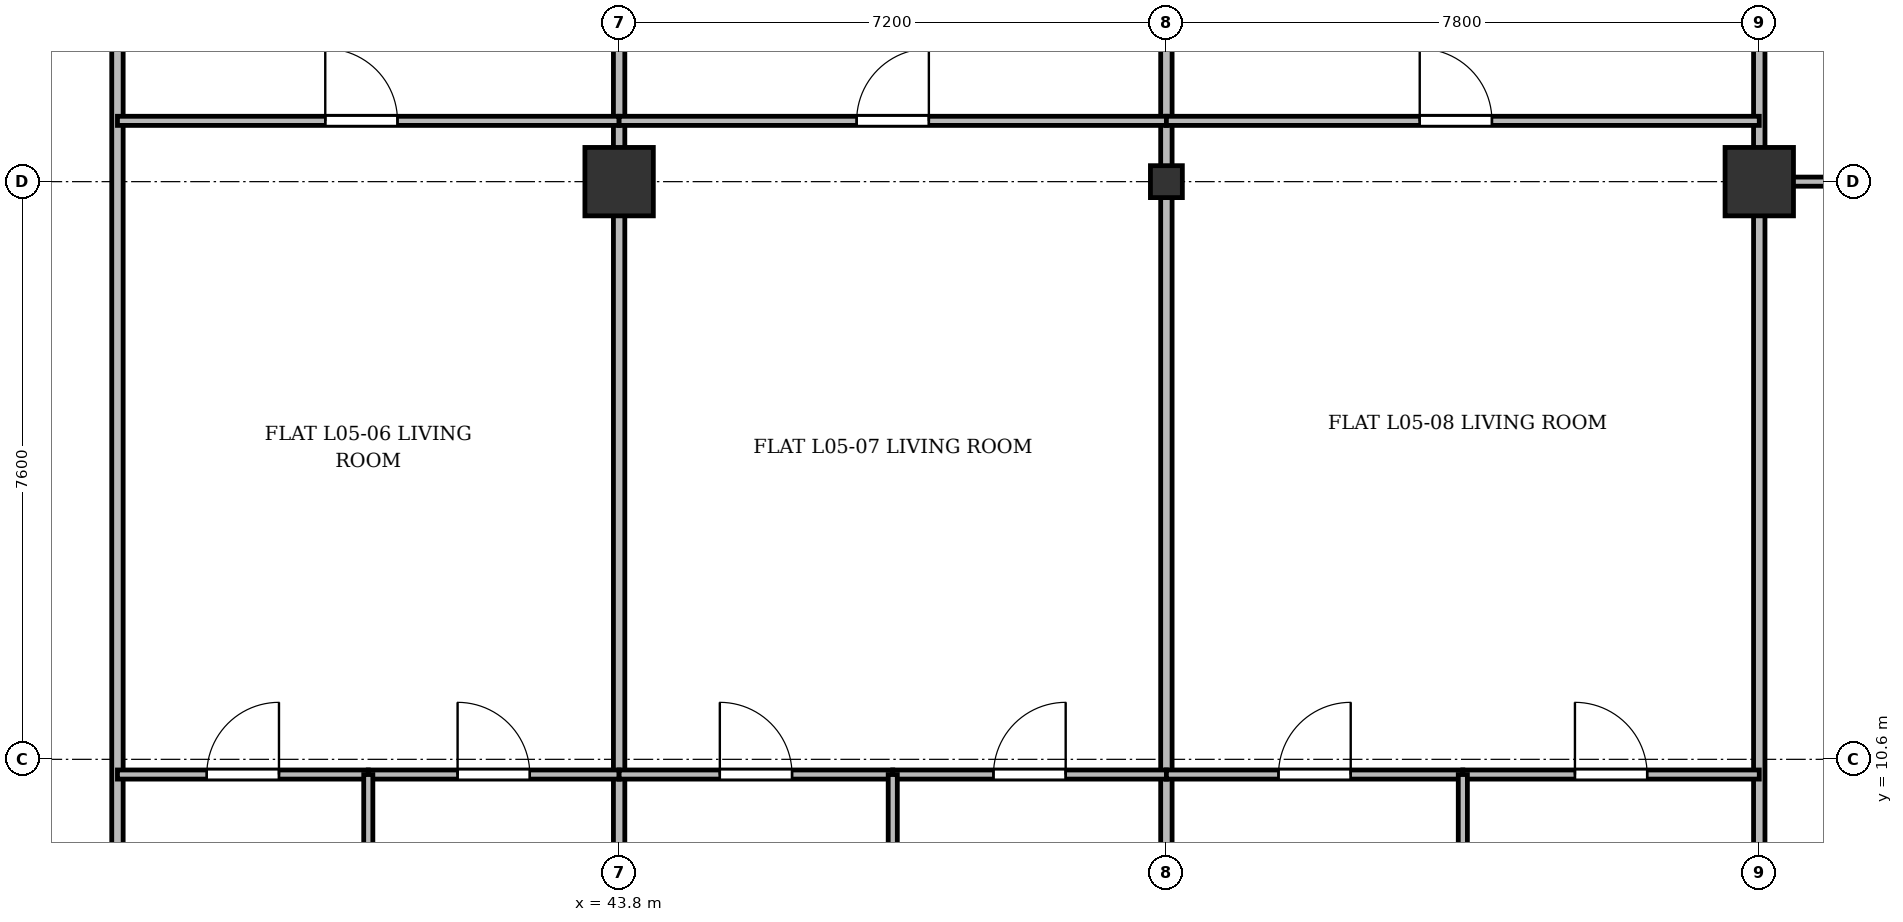
"""IFC4 building model, lengths in metres.
Left out: names, types, materials, properties, quantities, classifications, styles, units other than length and angle.
Written with IfcOpenShell. Run it as: python <this file> out.ifc"""

import sys

from ifc_helpers import new_model, si_unit, direction, frame, frame_2d, origin, origin_2d, place, context, subcontext, project, spatial, rectangle, i_section, extrude, source, transform, mapped, element, fill, save


model = new_model("IFC4")
c1 = context("Model", 3, precision=1e-05, world=origin(), true_north=direction((0.0, 1.0)))
c2 = subcontext(c1, "Body", "Model", "MODEL_VIEW")
j1 = project(units=[si_unit("LENGTHUNIT", "METRE"), si_unit("PLANEANGLEUNIT", "RADIAN")], contexts=[c1])
p1 = place(None, origin())
s1 = spatial("IfcSite", under=j1, at=p1, CompositionType="ELEMENT")
p2 = place(p1, origin())
s2 = spatial("IfcBuilding", under=s1, at=p2, CompositionType="ELEMENT")
p3 = place(p2, frame((0.0, 0.0, 23.5)))
s3 = spatial("IfcBuildingStorey", under=s2, at=p3, CompositionType="ELEMENT", Elevation=23.5)
m1 = source(origin(), c2, "Body", "SweptSolid", [
    extrude(rectangle(XDim=0.9, YDim=0.9, at=origin_2d()), origin(), (0.0, 0.0, 1.0), 3.6),
])
p4 = place(p3, frame((43.8, 18.2, 0.0), z_axis=(0.0, 0.0, 1.0), x_axis=(1.0, 0.0, 0.0)))
e1 = element("IfcColumn", 1, at=p4, inside=s3, PredefinedType="COLUMN", context=c2, shape_type="MappedRepresentation", body=[
    mapped(m1, transform((0.0, 0.0, 0.0), x_axis=(1.0, 0.0, 0.0), y_axis=(0.0, 1.0, 0.0), z_axis=(0.0, 0.0, 1.0), scale=1.0)),
])
m2 = source(origin(), c2, "Body", "SweptSolid", [
    extrude(i_section(OverallWidth=0.42, OverallDepth=0.42, WebThickness=0.026, FlangeThickness=0.04, at=origin_2d()), origin(), (0.0, 0.0, 1.0), 3.6),
])
p5 = place(p3, frame((51.0, 18.2, 0.0), z_axis=(0.0, 0.0, 1.0), x_axis=(1.0, 0.0, 0.0)))
e2 = element("IfcColumn", 2, at=p5, inside=s3, PredefinedType="COLUMN", context=c2, shape_type="MappedRepresentation", body=[
    mapped(m2, transform((0.0, 0.0, 0.0), x_axis=(1.0, 0.0, 0.0), y_axis=(0.0, 1.0, 0.0), z_axis=(0.0, 0.0, 1.0), scale=1.0)),
])
p6 = place(p3, frame((58.8, 18.2, 0.0), z_axis=(0.0, 0.0, 1.0), x_axis=(1.0, 0.0, 0.0)))
e3 = element("IfcColumn", 3, at=p6, inside=s3, PredefinedType="COLUMN", context=c2, shape_type="MappedRepresentation", body=[
    mapped(m1, transform((0.0, 0.0, 0.0), x_axis=(1.0, 0.0, 0.0), y_axis=(0.0, 1.0, 0.0), z_axis=(0.0, 0.0, 1.0), scale=1.0)),
])
p7 = place(p3, frame((37.2, 3.145, 0.0), z_axis=(0.0, 0.0, 1.0), x_axis=(0.0, 1.0, 0.0)))
e4 = element("IfcWall", 4, at=p7, inside=s3, PredefinedType="PARTITIONING", context=c2, shape_type="SweptSolid", body=[
    extrude(rectangle(XDim=24.455, YDim=0.15, at=frame_2d((12.228, 0.0))), origin(), (0.0, 0.0, 1.0), 2.69),
])
for number, where, z_axis, x_axis in (
    (5, (43.8, 3.145, 0.0), (0.0, 0.0, 1.0), (0.0, 1.0, 0.0)),
    (6, (51.0, 3.145, 0.0), (0.0, 0.0, 1.0), (0.0, 1.0, 0.0)),
    (7, (58.8, 3.145, 0.0), (0.0, 0.0, 1.0), (0.0, 1.0, 0.0)),
):
    element("IfcWall", number, at=place(p3, frame(where, z_axis=z_axis, x_axis=x_axis)), inside=s3, PredefinedType="PARTITIONING", context=c2, shape_type="SweptSolid", body=[
        extrude(rectangle(XDim=24.455, YDim=0.15, at=frame_2d((12.228, 0.0))), origin(), (0.0, 0.0, 1.0), 2.752),
    ])
p8 = place(p3, frame((37.2, 19.0, 0.0), z_axis=(0.0, 0.0, 1.0), x_axis=(1.0, 0.0, 0.0)))
e8 = element("IfcWall", 8, at=p8, inside=s3, PredefinedType="PARTITIONING", context=c2, shape_type="SweptSolid", body=[
    extrude(rectangle(XDim=6.6, YDim=0.12, at=frame_2d((3.3, 0.0))), origin(), (0.0, 0.0, 1.0), 2.752),
])
p9 = place(p8, frame((2.734, 0.0, 0.0)))
e9 = element("IfcOpeningElement", 9, at=p9, cuts=e8, PredefinedType="OPENING", context=c2, shape_type="SweptSolid", body=[
    extrude(rectangle(XDim=0.95, YDim=2.15, at=frame_2d((0.475, 1.075))), frame((0.0, 0.07, 0.0), z_axis=(0.0, -1.0, 0.0), x_axis=(1.0, 0.0, 0.0)), (0.0, 0.0, 1.0), 0.14),
])
p10 = place(p3, frame((37.2, 10.4, 0.0), z_axis=(0.0, 0.0, 1.0), x_axis=(1.0, 0.0, 0.0)))
e10 = element("IfcWall", 10, at=p10, inside=s3, PredefinedType="PARTITIONING", context=c2, shape_type="SweptSolid", body=[
    extrude(rectangle(XDim=3.3, YDim=0.12, at=frame_2d((1.65, 0.0))), origin(), (0.0, 0.0, 1.0), 3.34),
])
p11 = place(p10, frame((1.175, 0.0, 0.0)))
e11 = element("IfcOpeningElement", 11, at=p11, cuts=e10, PredefinedType="OPENING", context=c2, shape_type="SweptSolid", body=[
    extrude(rectangle(XDim=0.95, YDim=2.15, at=frame_2d((0.475, 1.075))), frame((0.0, 0.07, 0.0), z_axis=(0.0, -1.0, 0.0), x_axis=(1.0, 0.0, 0.0)), (0.0, 0.0, 1.0), 0.14),
])
p12 = place(p3, frame((40.5, 10.4, 0.0), z_axis=(0.0, 0.0, 1.0), x_axis=(1.0, 0.0, 0.0)))
e12 = element("IfcWall", 12, at=p12, inside=s3, PredefinedType="PARTITIONING", context=c2, shape_type="SweptSolid", body=[
    extrude(rectangle(XDim=3.3, YDim=0.12, at=frame_2d((1.65, 0.0))), origin(), (0.0, 0.0, 1.0), 2.752),
])
p13 = place(p12, frame((1.175, 0.0, 0.0)))
e13 = element("IfcOpeningElement", 13, at=p13, cuts=e12, PredefinedType="OPENING", context=c2, shape_type="SweptSolid", body=[
    extrude(rectangle(XDim=0.95, YDim=2.15, at=frame_2d((0.475, 1.075))), frame((0.0, 0.07, 0.0), z_axis=(0.0, -1.0, 0.0), x_axis=(1.0, 0.0, 0.0)), (0.0, 0.0, 1.0), 0.14),
])
p14 = place(p3, frame((40.5, 3.145, 0.0), z_axis=(0.0, 0.0, 1.0), x_axis=(0.0, 1.0, 0.0)))
e14 = element("IfcWall", 14, at=p14, inside=s3, PredefinedType="PARTITIONING", context=c2, shape_type="SweptSolid", body=[
    extrude(rectangle(XDim=7.255, YDim=0.12, at=frame_2d((3.627, 0.0))), origin(), (0.0, 0.0, 1.0), 2.69),
])
p15 = place(p3, frame((43.8, 19.0, 0.0), z_axis=(0.0, 0.0, 1.0), x_axis=(1.0, 0.0, 0.0)))
e15 = element("IfcWall", 15, at=p15, inside=s3, PredefinedType="PARTITIONING", context=c2, shape_type="SweptSolid", body=[
    extrude(rectangle(XDim=7.2, YDim=0.12, at=frame_2d((3.6, 0.0))), origin(), (0.0, 0.0, 1.0), 2.752),
])
p16 = place(p15, frame((3.125, 0.0, 0.0)))
e16 = element("IfcOpeningElement", 16, at=p16, cuts=e15, PredefinedType="OPENING", context=c2, shape_type="SweptSolid", body=[
    extrude(rectangle(XDim=0.95, YDim=2.15, at=frame_2d((0.475, 1.075))), frame((0.0, 0.07, 0.0), z_axis=(0.0, -1.0, 0.0), x_axis=(1.0, 0.0, 0.0)), (0.0, 0.0, 1.0), 0.14),
])
p17 = place(p3, frame((43.8, 10.4, 0.0), z_axis=(0.0, 0.0, 1.0), x_axis=(1.0, 0.0, 0.0)))
e17 = element("IfcWall", 17, at=p17, inside=s3, PredefinedType="PARTITIONING", context=c2, shape_type="SweptSolid", body=[
    extrude(rectangle(XDim=3.6, YDim=0.12, at=frame_2d((1.8, 0.0))), origin(), (0.0, 0.0, 1.0), 2.752),
])
p18 = place(p17, frame((1.325, 0.0, 0.0)))
e18 = element("IfcOpeningElement", 18, at=p18, cuts=e17, PredefinedType="OPENING", context=c2, shape_type="SweptSolid", body=[
    extrude(rectangle(XDim=0.95, YDim=2.15, at=frame_2d((0.475, 1.075))), frame((0.0, 0.07, 0.0), z_axis=(0.0, -1.0, 0.0), x_axis=(1.0, 0.0, 0.0)), (0.0, 0.0, 1.0), 0.14),
])
p19 = place(p3, frame((47.4, 10.4, 0.0), z_axis=(0.0, 0.0, 1.0), x_axis=(1.0, 0.0, 0.0)))
e19 = element("IfcWall", 19, at=p19, inside=s3, PredefinedType="PARTITIONING", context=c2, shape_type="SweptSolid", body=[
    extrude(rectangle(XDim=3.6, YDim=0.12, at=frame_2d((1.8, 0.0))), origin(), (0.0, 0.0, 1.0), 2.752),
])
p20 = place(p19, frame((1.325, 0.0, 0.0)))
e20 = element("IfcOpeningElement", 20, at=p20, cuts=e19, PredefinedType="OPENING", context=c2, shape_type="SweptSolid", body=[
    extrude(rectangle(XDim=0.95, YDim=2.15, at=frame_2d((0.475, 1.075))), frame((0.0, 0.07, 0.0), z_axis=(0.0, -1.0, 0.0), x_axis=(1.0, 0.0, 0.0)), (0.0, 0.0, 1.0), 0.14),
])
p21 = place(p3, frame((47.4, 3.145, 0.0), z_axis=(0.0, 0.0, 1.0), x_axis=(0.0, 1.0, 0.0)))
e21 = element("IfcWall", 21, at=p21, inside=s3, PredefinedType="PARTITIONING", context=c2, shape_type="SweptSolid", body=[
    extrude(rectangle(XDim=7.255, YDim=0.12, at=frame_2d((3.627, 0.0))), origin(), (0.0, 0.0, 1.0), 2.69),
])
p22 = place(p3, frame((51.0, 19.0, 0.0), z_axis=(0.0, 0.0, 1.0), x_axis=(1.0, 0.0, 0.0)))
e22 = element("IfcWall", 22, at=p22, inside=s3, PredefinedType="PARTITIONING", context=c2, shape_type="SweptSolid", body=[
    extrude(rectangle(XDim=7.8, YDim=0.12, at=frame_2d((3.9, 0.0))), origin(), (0.0, 0.0, 1.0), 2.752),
])
p23 = place(p22, frame((3.333, 0.0, 0.0)))
e23 = element("IfcOpeningElement", 23, at=p23, cuts=e22, PredefinedType="OPENING", context=c2, shape_type="SweptSolid", body=[
    extrude(rectangle(XDim=0.95, YDim=2.15, at=frame_2d((0.475, 1.075))), frame((0.0, 0.07, 0.0), z_axis=(0.0, -1.0, 0.0), x_axis=(1.0, 0.0, 0.0)), (0.0, 0.0, 1.0), 0.14),
])
p24 = place(p3, frame((51.0, 10.4, 0.0), z_axis=(0.0, 0.0, 1.0), x_axis=(1.0, 0.0, 0.0)))
e24 = element("IfcWall", 24, at=p24, inside=s3, PredefinedType="PARTITIONING", context=c2, shape_type="SweptSolid", body=[
    extrude(rectangle(XDim=3.9, YDim=0.12, at=frame_2d((1.95, 0.0))), origin(), (0.0, 0.0, 1.0), 2.752),
])
p25 = place(p24, frame((1.475, 0.0, 0.0)))
e25 = element("IfcOpeningElement", 25, at=p25, cuts=e24, PredefinedType="OPENING", context=c2, shape_type="SweptSolid", body=[
    extrude(rectangle(XDim=0.95, YDim=2.15, at=frame_2d((0.475, 1.075))), frame((0.0, 0.07, 0.0), z_axis=(0.0, -1.0, 0.0), x_axis=(1.0, 0.0, 0.0)), (0.0, 0.0, 1.0), 0.14),
])
p26 = place(p3, frame((54.9, 10.4, 0.0), z_axis=(0.0, 0.0, 1.0), x_axis=(1.0, 0.0, 0.0)))
e26 = element("IfcWall", 26, at=p26, inside=s3, PredefinedType="PARTITIONING", context=c2, shape_type="SweptSolid", body=[
    extrude(rectangle(XDim=3.9, YDim=0.12, at=frame_2d((1.95, 0.0))), origin(), (0.0, 0.0, 1.0), 2.752),
])
p27 = place(p26, frame((1.475, 0.0, 0.0)))
e27 = element("IfcOpeningElement", 27, at=p27, cuts=e26, PredefinedType="OPENING", context=c2, shape_type="SweptSolid", body=[
    extrude(rectangle(XDim=0.95, YDim=2.15, at=frame_2d((0.475, 1.075))), frame((0.0, 0.07, 0.0), z_axis=(0.0, -1.0, 0.0), x_axis=(1.0, 0.0, 0.0)), (0.0, 0.0, 1.0), 0.14),
])
p28 = place(p3, frame((54.9, 3.145, 0.0), z_axis=(0.0, 0.0, 1.0), x_axis=(0.0, 1.0, 0.0)))
e28 = element("IfcWall", 28, at=p28, inside=s3, PredefinedType="PARTITIONING", context=c2, shape_type="SweptSolid", body=[
    extrude(rectangle(XDim=7.255, YDim=0.12, at=frame_2d((3.627, 0.0))), origin(), (0.0, 0.0, 1.0), 2.69),
])
p29 = place(p3, frame((58.8, 18.2, 0.0), z_axis=(0.0, 0.0, 1.0), x_axis=(1.0, 0.0, 0.0)))
e29 = element("IfcWall", 29, at=p29, inside=s3, PredefinedType="PARTITIONING", context=c2, shape_type="SweptSolid", body=[
    extrude(rectangle(XDim=6.8, YDim=0.12, at=frame_2d((3.4, 0.0))), origin(), (0.0, 0.0, 1.0), 2.69),
])
p30 = place(p29, frame((2.925, 0.0, 0.0)))
e30 = element("IfcOpeningElement", 30, at=p30, cuts=e29, PredefinedType="OPENING", context=c2, shape_type="SweptSolid", body=[
    extrude(rectangle(XDim=0.95, YDim=2.15, at=frame_2d((0.475, 1.075))), frame((0.0, 0.07, 0.0), z_axis=(0.0, -1.0, 0.0), x_axis=(1.0, 0.0, 0.0)), (0.0, 0.0, 1.0), 0.14),
])
m3 = source(origin(), c2, "Body", "SweptSolid", [
    extrude(rectangle(XDim=0.95, YDim=2.15, at=frame_2d((0.475, 1.075))), frame((0.0, 0.025, 0.0), z_axis=(0.0, -1.0, 0.0), x_axis=(1.0, 0.0, 0.0)), (0.0, 0.0, 1.0), 0.05),
])
p31 = place(p9, origin())
e31 = element("IfcDoor", 31, at=p31, inside=s3, OperationType="SINGLE_SWING_LEFT", PredefinedType="DOOR", context=c2, shape_type="MappedRepresentation", body=[
    mapped(m3, transform((0.0, 0.0, 0.0), x_axis=(1.0, 0.0, 0.0), y_axis=(0.0, 1.0, 0.0), z_axis=(0.0, 0.0, 1.0), scale=1.0)),
])
fill(e9, e31)
p32 = place(p11, origin())
e32 = element("IfcDoor", 32, at=p32, inside=s3, OperationType="SINGLE_SWING_RIGHT", PredefinedType="DOOR", context=c2, shape_type="MappedRepresentation", body=[
    mapped(m3, transform((0.0, 0.0, 0.0), x_axis=(1.0, 0.0, 0.0), y_axis=(0.0, 1.0, 0.0), z_axis=(0.0, 0.0, 1.0), scale=1.0)),
])
fill(e11, e32)
p33 = place(p13, origin())
e33 = element("IfcDoor", 33, at=p33, inside=s3, OperationType="SINGLE_SWING_LEFT", PredefinedType="DOOR", context=c2, shape_type="MappedRepresentation", body=[
    mapped(m3, transform((0.0, 0.0, 0.0), x_axis=(1.0, 0.0, 0.0), y_axis=(0.0, 1.0, 0.0), z_axis=(0.0, 0.0, 1.0), scale=1.0)),
])
fill(e13, e33)
p34 = place(p16, origin())
e34 = element("IfcDoor", 34, at=p34, inside=s3, OperationType="SINGLE_SWING_RIGHT", PredefinedType="DOOR", context=c2, shape_type="MappedRepresentation", body=[
    mapped(m3, transform((0.0, 0.0, 0.0), x_axis=(1.0, 0.0, 0.0), y_axis=(0.0, 1.0, 0.0), z_axis=(0.0, 0.0, 1.0), scale=1.0)),
])
fill(e16, e34)
p35 = place(p18, origin())
e35 = element("IfcDoor", 35, at=p35, inside=s3, OperationType="SINGLE_SWING_LEFT", PredefinedType="DOOR", context=c2, shape_type="MappedRepresentation", body=[
    mapped(m3, transform((0.0, 0.0, 0.0), x_axis=(1.0, 0.0, 0.0), y_axis=(0.0, 1.0, 0.0), z_axis=(0.0, 0.0, 1.0), scale=1.0)),
])
fill(e18, e35)
p36 = place(p20, origin())
e36 = element("IfcDoor", 36, at=p36, inside=s3, OperationType="SINGLE_SWING_RIGHT", PredefinedType="DOOR", context=c2, shape_type="MappedRepresentation", body=[
    mapped(m3, transform((0.0, 0.0, 0.0), x_axis=(1.0, 0.0, 0.0), y_axis=(0.0, 1.0, 0.0), z_axis=(0.0, 0.0, 1.0), scale=1.0)),
])
fill(e20, e36)
p37 = place(p23, origin())
e37 = element("IfcDoor", 37, at=p37, inside=s3, OperationType="SINGLE_SWING_LEFT", PredefinedType="DOOR", context=c2, shape_type="MappedRepresentation", body=[
    mapped(m3, transform((0.0, 0.0, 0.0), x_axis=(1.0, 0.0, 0.0), y_axis=(0.0, 1.0, 0.0), z_axis=(0.0, 0.0, 1.0), scale=1.0)),
])
fill(e23, e37)
p38 = place(p25, origin())
e38 = element("IfcDoor", 38, at=p38, inside=s3, OperationType="SINGLE_SWING_RIGHT", PredefinedType="DOOR", context=c2, shape_type="MappedRepresentation", body=[
    mapped(m3, transform((0.0, 0.0, 0.0), x_axis=(1.0, 0.0, 0.0), y_axis=(0.0, 1.0, 0.0), z_axis=(0.0, 0.0, 1.0), scale=1.0)),
])
fill(e25, e38)
p39 = place(p27, origin())
e39 = element("IfcDoor", 39, at=p39, inside=s3, OperationType="SINGLE_SWING_LEFT", PredefinedType="DOOR", context=c2, shape_type="MappedRepresentation", body=[
    mapped(m3, transform((0.0, 0.0, 0.0), x_axis=(1.0, 0.0, 0.0), y_axis=(0.0, 1.0, 0.0), z_axis=(0.0, 0.0, 1.0), scale=1.0)),
])
fill(e27, e39)
save(model, sys.argv[1])
